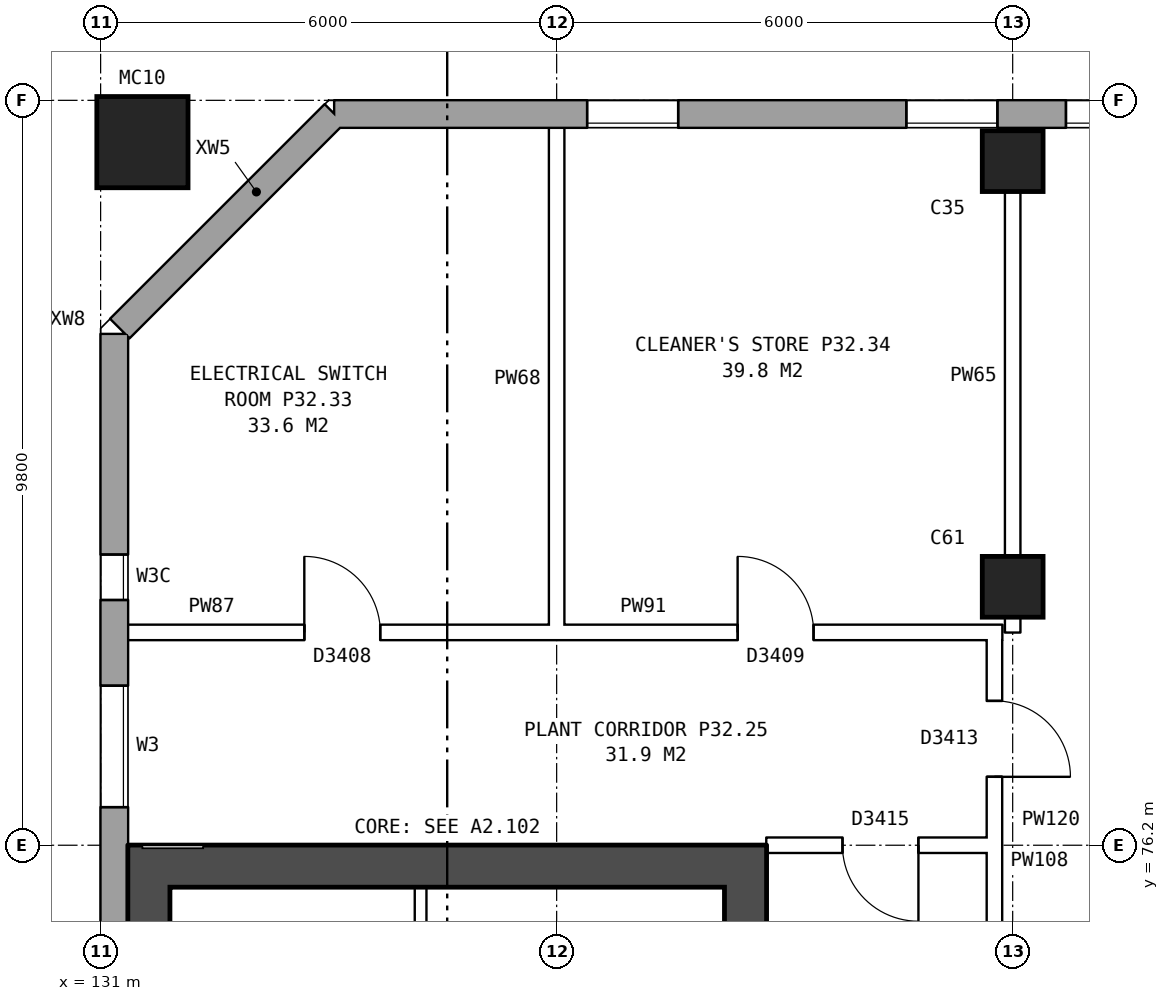
"""IFC4 building model, lengths in metres.
Left out: names, types, materials, properties, quantities, classifications, styles, units other than length and angle.
Written with IfcOpenShell. Run it as: python <this file> out.ifc"""

import sys

from ifc_helpers import new_model, si_unit, direction, frame, frame_2d, origin, origin_2d, place, context, subcontext, project, spatial, rectangle, hollow_rectangle, extrude, element, fill, save


model = new_model("IFC4")
c1 = context("Model", 3, precision=1e-05, world=origin(), true_north=direction((0.0, 1.0)))
c2 = subcontext(c1, "Body", "Model", "MODEL_VIEW")
j1 = project(units=[si_unit("LENGTHUNIT", "METRE"), si_unit("PLANEANGLEUNIT", "RADIAN")], contexts=[c1])
p1 = place(None, origin())
s1 = spatial("IfcSite", under=j1, at=p1, CompositionType="ELEMENT")
p2 = place(p1, origin())
s2 = spatial("IfcBuilding", under=s1, at=p2, CompositionType="ELEMENT")
p3 = place(p2, frame((0.0, 0.0, 115.0)))
s3 = spatial("IfcBuildingStorey", under=s2, at=p3, CompositionType="ELEMENT", Elevation=115.0)
for number, where, z_axis, x_axis in (
    (1, (143.0, 79.6, 0.0), (0.0, 0.0, 1.0), (1.0, 0.0, 0.0)),
    (2, (143.0, 85.2, 0.0), (0.0, 0.0, 1.0), (1.0, 0.0, 0.0)),
):
    element("IfcColumn", number, at=place(p3, frame(where, z_axis=z_axis, x_axis=x_axis)), inside=s3, PredefinedType="COLUMN", context=c2, shape_type="SweptSolid", body=[
        extrude(rectangle(XDim=0.8, YDim=0.8, at=origin_2d()), origin(), (0.0, 0.0, 1.0), 4.2),
    ])
p4 = place(p3, frame((131.55, 85.45, 0.0), z_axis=(0.0, 0.0, 1.0), x_axis=(1.0, 0.0, 0.0)))
e3 = element("IfcColumn", 3, at=p4, inside=s3, PredefinedType="COLUMN", context=c2, shape_type="SweptSolid", body=[
    extrude(hollow_rectangle(XDim=1.2, YDim=1.2, WallThickness=0.065, at=origin_2d()), origin(), (0.0, 0.0, 1.0), 4.5),
])
p5 = place(p3, frame((169.675, 85.82, 0.0), z_axis=(0.0, 0.0, 1.0), x_axis=(-1.0, 0.0, 0.0)))
e4 = element("IfcWall", 4, at=p5, inside=s3, PredefinedType="STANDARD", context=c2, shape_type="SweptSolid", body=[
    extrude(rectangle(XDim=35.601, YDim=0.36, at=frame_2d((17.8, 0.0))), origin(), (0.0, 0.0, 1.0), 4.2),
])
p6 = place(p5, frame((0.375, 0.0, 1.5)))
e5 = element("IfcOpeningElement", 5, at=p6, cuts=e4, PredefinedType="OPENING", context=c2, shape_type="SweptSolid", body=[
    extrude(rectangle(XDim=1.6, YDim=1.2, at=frame_2d((0.8, 0.6))), frame((0.0, 0.19, 0.0), z_axis=(0.0, -1.0, 0.0), x_axis=(1.0, 0.0, 0.0)), (0.0, 0.0, 1.0), 0.38),
])
p7 = place(p5, frame((2.875, 0.0, 1.5)))
e6 = element("IfcOpeningElement", 6, at=p7, cuts=e4, PredefinedType="OPENING", context=c2, shape_type="SweptSolid", body=[
    extrude(rectangle(XDim=1.6, YDim=1.2, at=frame_2d((0.8, 0.6))), frame((0.0, 0.19, 0.0), z_axis=(0.0, -1.0, 0.0), x_axis=(1.0, 0.0, 0.0)), (0.0, 0.0, 1.0), 0.38),
])
p8 = place(p5, frame((7.175, 0.0, 1.5)))
e7 = element("IfcOpeningElement", 7, at=p8, cuts=e4, PredefinedType="OPENING", context=c2, shape_type="SweptSolid", body=[
    extrude(rectangle(XDim=1.2, YDim=1.2, at=frame_2d((0.6, 0.6))), frame((0.0, 0.19, 0.0), z_axis=(0.0, -1.0, 0.0), x_axis=(1.0, 0.0, 0.0)), (0.0, 0.0, 1.0), 0.38),
])
p9 = place(p5, frame((12.375, 0.0, 1.5)))
e8 = element("IfcOpeningElement", 8, at=p9, cuts=e4, PredefinedType="OPENING", context=c2, shape_type="SweptSolid", body=[
    extrude(rectangle(XDim=1.6, YDim=1.2, at=frame_2d((0.8, 0.6))), frame((0.0, 0.19, 0.0), z_axis=(0.0, -1.0, 0.0), x_axis=(1.0, 0.0, 0.0)), (0.0, 0.0, 1.0), 0.38),
])
p10 = place(p5, frame((14.275, 0.0, 1.5)))
e9 = element("IfcOpeningElement", 9, at=p10, cuts=e4, PredefinedType="OPENING", context=c2, shape_type="SweptSolid", body=[
    extrude(rectangle(XDim=0.6, YDim=1.2, at=frame_2d((0.3, 0.6))), frame((0.0, 0.19, 0.0), z_axis=(0.0, -1.0, 0.0), x_axis=(1.0, 0.0, 0.0)), (0.0, 0.0, 1.0), 0.38),
])
p11 = place(p5, frame((15.175, 0.0, 1.5)))
e10 = element("IfcOpeningElement", 10, at=p11, cuts=e4, PredefinedType="OPENING", context=c2, shape_type="SweptSolid", body=[
    extrude(rectangle(XDim=1.2, YDim=1.2, at=frame_2d((0.6, 0.6))), frame((0.0, 0.19, 0.0), z_axis=(0.0, -1.0, 0.0), x_axis=(1.0, 0.0, 0.0)), (0.0, 0.0, 1.0), 0.38),
])
p12 = place(p5, frame((24.375, 0.0, 1.5)))
e11 = element("IfcOpeningElement", 11, at=p12, cuts=e4, PredefinedType="OPENING", context=c2, shape_type="SweptSolid", body=[
    extrude(rectangle(XDim=1.6, YDim=1.2, at=frame_2d((0.8, 0.6))), frame((0.0, 0.19, 0.0), z_axis=(0.0, -1.0, 0.0), x_axis=(1.0, 0.0, 0.0)), (0.0, 0.0, 1.0), 0.38),
])
p13 = place(p5, frame((26.875, 0.0, 1.5)))
e12 = element("IfcOpeningElement", 12, at=p13, cuts=e4, PredefinedType="OPENING", context=c2, shape_type="SweptSolid", body=[
    extrude(rectangle(XDim=1.2, YDim=1.2, at=frame_2d((0.6, 0.6))), frame((0.0, 0.19, 0.0), z_axis=(0.0, -1.0, 0.0), x_axis=(1.0, 0.0, 0.0)), (0.0, 0.0, 1.0), 0.38),
])
p14 = place(p5, frame((31.075, 0.0, 1.5)))
e13 = element("IfcOpeningElement", 13, at=p14, cuts=e4, PredefinedType="OPENING", context=c2, shape_type="SweptSolid", body=[
    extrude(rectangle(XDim=1.2, YDim=1.2, at=frame_2d((0.6, 0.6))), frame((0.0, 0.19, 0.0), z_axis=(0.0, -1.0, 0.0), x_axis=(1.0, 0.0, 0.0)), (0.0, 0.0, 1.0), 0.38),
])
p15 = place(p5, frame((19.125, 0.0, 1.5)))
e14 = element("IfcOpeningElement", 14, at=p15, cuts=e4, PredefinedType="OPENING", context=c2, shape_type="SweptSolid", body=[
    extrude(rectangle(XDim=1.2, YDim=1.2, at=frame_2d((0.6, 0.6))), frame((0.0, 0.19, 0.0), z_axis=(0.0, -1.0, 0.0), x_axis=(1.0, 0.0, 0.0)), (0.0, 0.0, 1.0), 0.38),
])
p16 = place(p3, frame((134.075, 85.82, 0.0), z_axis=(0.0, 0.0, 1.0), x_axis=(-0.707148882153, -0.707064677713, 0.0)))
e15 = element("IfcWall", 15, at=p16, inside=s3, PredefinedType="STANDARD", context=c2, shape_type="SweptSolid", body=[
    extrude(rectangle(XDim=2.899, YDim=0.36, at=frame_2d((1.45, 0.0))), origin(), (0.0, 0.0, 1.0), 4.2),
])
p17 = place(p3, frame((132.024, 83.77, 0.953), z_axis=(0.0, 0.0, 1.0), x_axis=(-0.706994764273, -0.707218780358, 0.0)))
e16 = element("IfcWall", 16, at=p17, inside=s3, PredefinedType="STANDARD", context=c2, shape_type="SweptSolid", body=[
    extrude(rectangle(XDim=1.09, YDim=0.36, at=frame_2d((0.545, 0.0))), origin(), (0.0, 0.0, 1.0), 2.444),
])
p18 = place(p3, frame((131.18, 82.925, 0.0), z_axis=(0.0, 0.0, 1.0), x_axis=(0.0, -1.0, 0.0)))
e17 = element("IfcWall", 17, at=p18, inside=s3, PredefinedType="STANDARD", context=c2, shape_type="SweptSolid", body=[
    extrude(rectangle(XDim=25.851, YDim=0.36, at=frame_2d((12.925, 0.0))), origin(), (0.0, 0.0, 1.0), 4.2),
])
p19 = place(p18, frame((2.9, 0.0, 1.5)))
e18 = element("IfcOpeningElement", 18, at=p19, cuts=e17, PredefinedType="OPENING", context=c2, shape_type="SweptSolid", body=[
    extrude(rectangle(XDim=0.6, YDim=1.2, at=frame_2d((0.3, 0.6))), frame((0.0, 0.19, 0.0), z_axis=(0.0, -1.0, 0.0), x_axis=(1.0, 0.0, 0.0)), (0.0, 0.0, 1.0), 0.38),
])
p20 = place(p18, frame((4.625, 0.0, 1.5)))
e19 = element("IfcOpeningElement", 19, at=p20, cuts=e17, PredefinedType="OPENING", context=c2, shape_type="SweptSolid", body=[
    extrude(rectangle(XDim=1.6, YDim=1.2, at=frame_2d((0.8, 0.6))), frame((0.0, 0.19, 0.0), z_axis=(0.0, -1.0, 0.0), x_axis=(1.0, 0.0, 0.0)), (0.0, 0.0, 1.0), 0.38),
])
p21 = place(p18, frame((21.1, 0.0, 1.5)))
e20 = element("IfcOpeningElement", 20, at=p21, cuts=e17, PredefinedType="OPENING", context=c2, shape_type="SweptSolid", body=[
    extrude(rectangle(XDim=0.6, YDim=1.2, at=frame_2d((0.3, 0.6))), frame((0.0, 0.19, 0.0), z_axis=(0.0, -1.0, 0.0), x_axis=(1.0, 0.0, 0.0)), (0.0, 0.0, 1.0), 0.38),
])
p22 = place(p18, frame((22.325, 0.0, 1.5)))
e21 = element("IfcOpeningElement", 21, at=p22, cuts=e17, PredefinedType="OPENING", context=c2, shape_type="SweptSolid", body=[
    extrude(rectangle(XDim=0.6, YDim=1.2, at=frame_2d((0.3, 0.6))), frame((0.0, 0.19, 0.0), z_axis=(0.0, -1.0, 0.0), x_axis=(1.0, 0.0, 0.0)), (0.0, 0.0, 1.0), 0.38),
])
p23 = place(p3, frame((139.485, 63.8, 0.0), z_axis=(0.0, 0.0, 1.0), x_axis=(0.0, 1.0, 0.0)))
e22 = element("IfcWall", 22, at=p23, inside=s3, PredefinedType="SHEAR", context=c2, shape_type="SweptSolid", body=[
    extrude(rectangle(XDim=12.4, YDim=0.55, at=frame_2d((6.2, 0.0))), origin(), (0.0, 0.0, 1.0), 4.2),
])
p24 = place(p23, frame((1.325, 0.0, 0.0)))
e23 = element("IfcOpeningElement", 23, at=p24, cuts=e22, PredefinedType="OPENING", context=c2, shape_type="SweptSolid", body=[
    extrude(rectangle(XDim=1.1, YDim=2.1, at=frame_2d((0.55, 1.05))), frame((0.0, 0.285, 0.0), z_axis=(0.0, -1.0, 0.0), x_axis=(1.0, 0.0, 0.0)), (0.0, 0.0, 1.0), 0.57),
])
p25 = place(p23, frame((9.9, 0.0, 0.0)))
e24 = element("IfcOpeningElement", 24, at=p25, cuts=e22, PredefinedType="OPENING", context=c2, shape_type="SweptSolid", body=[
    extrude(rectangle(XDim=1.1, YDim=2.1, at=frame_2d((0.55, 1.05))), frame((0.0, 0.285, 0.0), z_axis=(0.0, -1.0, 0.0), x_axis=(1.0, 0.0, 0.0)), (0.0, 0.0, 1.0), 0.57),
])
p26 = place(p23, frame((8.125, 0.0, 0.0)))
e25 = element("IfcOpeningElement", 25, at=p26, cuts=e22, PredefinedType="OPENING", context=c2, shape_type="SweptSolid", body=[
    extrude(rectangle(XDim=0.85, YDim=2.1, at=frame_2d((0.425, 1.05))), frame((0.0, 0.285, 0.0), z_axis=(0.0, -1.0, 0.0), x_axis=(1.0, 0.0, 0.0)), (0.0, 0.0, 1.0), 0.57),
])
p27 = place(p3, frame((131.635, 63.8, 0.0), z_axis=(0.0, 0.0, 1.0), x_axis=(0.0, 1.0, 0.0)))
e26 = element("IfcWall", 26, at=p27, inside=s3, PredefinedType="SHEAR", context=c2, shape_type="SweptSolid", body=[
    extrude(rectangle(XDim=12.4, YDim=0.55, at=frame_2d((6.2, 0.0))), origin(), (0.0, 0.0, 1.0), 4.2),
])
p28 = place(p3, frame((139.21, 75.925, 0.0), z_axis=(0.0, 0.0, 1.0), x_axis=(-1.0, 0.0, 0.0)))
e27 = element("IfcWall", 27, at=p28, inside=s3, PredefinedType="SHEAR", context=c2, shape_type="SweptSolid", body=[
    extrude(rectangle(XDim=7.3, YDim=0.55, at=frame_2d((3.65, 0.0))), origin(), (0.0, 0.0, 1.0), 4.2),
])
p29 = place(p3, frame((135.21, 71.375, 0.0), z_axis=(0.0, 0.0, 1.0), x_axis=(0.0, 1.0, 0.0)))
e28 = element("IfcWall", 28, at=p29, inside=s3, PredefinedType="PARTITIONING", context=c2, shape_type="SweptSolid", body=[
    extrude(rectangle(XDim=4.275, YDim=0.15, at=frame_2d((2.137, 0.0))), origin(), (0.0, 0.0, 1.0), 4.2),
])
p30 = place(p29, frame((2.625, 0.0, 0.0)))
e29 = element("IfcOpeningElement", 29, at=p30, cuts=e28, PredefinedType="OPENING", context=c2, shape_type="SweptSolid", body=[
    extrude(rectangle(XDim=1.1, YDim=2.1, at=frame_2d((0.55, 1.05))), frame((0.0, 0.085, 0.0), z_axis=(0.0, -1.0, 0.0), x_axis=(1.0, 0.0, 0.0)), (0.0, 0.0, 1.0), 0.17),
])
p31 = place(p3, frame((142.76, 63.9, 0.0), z_axis=(0.0, 0.0, 1.0), x_axis=(0.0, 1.0, 0.0)))
e30 = element("IfcWall", 30, at=p31, inside=s3, PredefinedType="PARTITIONING", context=c2, shape_type="SweptSolid", body=[
    extrude(rectangle(XDim=12.2, YDim=0.2, at=frame_2d((6.1, 0.0))), origin(), (0.0, 0.0, 1.0), 4.2),
])
p32 = place(p31, frame((5.1, 0.0, 0.0)))
e31 = element("IfcOpeningElement", 31, at=p32, cuts=e30, PredefinedType="OPENING", context=c2, shape_type="SweptSolid", body=[
    extrude(rectangle(XDim=2.0, YDim=2.1, at=frame_2d((1.0, 1.05))), frame((0.0, 0.11, 0.0), z_axis=(0.0, -1.0, 0.0), x_axis=(1.0, 0.0, 0.0)), (0.0, 0.0, 1.0), 0.22),
])
p33 = place(p3, frame((139.76, 76.2, 0.0), z_axis=(0.0, 0.0, 1.0), x_axis=(1.0, 0.0, 0.0)))
e32 = element("IfcWall", 32, at=p33, inside=s3, PredefinedType="PARTITIONING", context=c2, shape_type="SweptSolid", body=[
    extrude(rectangle(XDim=3.1, YDim=0.2, at=frame_2d((1.55, 0.0))), origin(), (0.0, 0.0, 1.0), 4.2),
])
p34 = place(p33, frame((1.0, 0.0, 0.0)))
e33 = element("IfcOpeningElement", 33, at=p34, cuts=e32, PredefinedType="OPENING", context=c2, shape_type="SweptSolid", body=[
    extrude(rectangle(XDim=1.0, YDim=2.1, at=frame_2d((0.5, 1.05))), frame((0.0, 0.11, 0.0), z_axis=(0.0, -1.0, 0.0), x_axis=(1.0, 0.0, 0.0)), (0.0, 0.0, 1.0), 0.22),
])
p35 = place(p3, frame((131.24, 79.0, 0.0), z_axis=(0.0, 0.0, 1.0), x_axis=(1.0, 0.0, 0.0)))
e34 = element("IfcWall", 34, at=p35, inside=s3, PredefinedType="PARTITIONING", context=c2, shape_type="SweptSolid", body=[
    extrude(rectangle(XDim=5.86, YDim=0.2, at=frame_2d((2.93, 0.0))), origin(), (0.0, 0.0, 1.0), 4.2),
])
p36 = place(p35, frame((2.44, 0.0, 0.0)))
e35 = element("IfcOpeningElement", 35, at=p36, cuts=e34, PredefinedType="OPENING", context=c2, shape_type="SweptSolid", body=[
    extrude(rectangle(XDim=1.0, YDim=2.1, at=frame_2d((0.5, 1.05))), frame((0.0, 0.11, 0.0), z_axis=(0.0, -1.0, 0.0), x_axis=(1.0, 0.0, 0.0)), (0.0, 0.0, 1.0), 0.22),
])
p37 = place(p3, frame((136.9, 79.0, 0.0), z_axis=(0.0, 0.0, 1.0), x_axis=(1.0, 0.0, 0.0)))
e36 = element("IfcWall", 36, at=p37, inside=s3, PredefinedType="PARTITIONING", context=c2, shape_type="SweptSolid", body=[
    extrude(rectangle(XDim=5.962, YDim=0.2, at=frame_2d((2.981, 0.0))), origin(), (0.0, 0.0, 1.0), 4.2),
])
p38 = place(p37, frame((2.481, 0.0, 0.0)))
e37 = element("IfcOpeningElement", 37, at=p38, cuts=e36, PredefinedType="OPENING", context=c2, shape_type="SweptSolid", body=[
    extrude(rectangle(XDim=1.0, YDim=2.1, at=frame_2d((0.5, 1.05))), frame((0.0, 0.11, 0.0), z_axis=(0.0, -1.0, 0.0), x_axis=(1.0, 0.0, 0.0)), (0.0, 0.0, 1.0), 0.22),
])
p39 = place(p3, frame((137.0, 78.9, 0.0), z_axis=(0.0, 0.0, 1.0), x_axis=(0.0, 1.0, 0.0)))
e38 = element("IfcWall", 38, at=p39, inside=s3, PredefinedType="PARTITIONING", context=c2, shape_type="SweptSolid", body=[
    extrude(rectangle(XDim=6.86, YDim=0.2, at=frame_2d((3.43, 0.0))), origin(), (0.0, 0.0, 1.0), 4.2),
])
p40 = place(p3, frame((142.76, 76.1, 0.0), z_axis=(0.0, 0.0, 1.0), x_axis=(0.0, 1.0, 0.0)))
e39 = element("IfcWall", 39, at=p40, inside=s3, PredefinedType="PARTITIONING", context=c2, shape_type="SweptSolid", body=[
    extrude(rectangle(XDim=3.0, YDim=0.2, at=frame_2d((1.5, 0.0))), origin(), (0.0, 0.0, 1.0), 4.2),
])
p41 = place(p40, frame((1.0, 0.0, 0.0)))
e40 = element("IfcOpeningElement", 40, at=p41, cuts=e39, PredefinedType="OPENING", context=c2, shape_type="SweptSolid", body=[
    extrude(rectangle(XDim=1.0, YDim=2.1, at=frame_2d((0.5, 1.05))), frame((0.0, 0.11, 0.0), z_axis=(0.0, -1.0, 0.0), x_axis=(1.0, 0.0, 0.0)), (0.0, 0.0, 1.0), 0.22),
])
p42 = place(p3, frame((143.0, 79.0, 0.0), z_axis=(0.0, 0.0, 1.0), x_axis=(0.0, 1.0, 0.0)))
e41 = element("IfcWall", 41, at=p42, inside=s3, PredefinedType="PARTITIONING", context=c2, shape_type="SweptSolid", body=[
    extrude(rectangle(XDim=6.76, YDim=0.2, at=frame_2d((3.38, 0.0))), origin(), (0.0, 0.0, 1.0), 4.2),
])
p43 = place(p12, origin())
e42 = element("IfcWindow", 42, at=p43, inside=s3, PartitioningType="DOUBLE_PANEL_HORIZONTAL", PredefinedType="WINDOW", context=c2, shape_type="SweptSolid", body=[
    extrude(rectangle(XDim=1.6, YDim=1.2, at=frame_2d((0.8, 0.6))), frame((0.0, 0.15, 0.0), z_axis=(0.0, -1.0, 0.0), x_axis=(1.0, 0.0, 0.0)), (0.0, 0.0, 1.0), 0.06),
])
fill(e11, e42)
p44 = place(p13, origin())
e43 = element("IfcWindow", 43, at=p44, inside=s3, PartitioningType="DOUBLE_PANEL_HORIZONTAL", PredefinedType="WINDOW", context=c2, shape_type="SweptSolid", body=[
    extrude(rectangle(XDim=1.2, YDim=1.2, at=frame_2d((0.6, 0.6))), frame((0.0, 0.15, 0.0), z_axis=(0.0, -1.0, 0.0), x_axis=(1.0, 0.0, 0.0)), (0.0, 0.0, 1.0), 0.06),
])
fill(e12, e43)
p45 = place(p14, origin())
e44 = element("IfcWindow", 44, at=p45, inside=s3, PartitioningType="DOUBLE_PANEL_HORIZONTAL", PredefinedType="WINDOW", context=c2, shape_type="SweptSolid", body=[
    extrude(rectangle(XDim=1.2, YDim=1.2, at=frame_2d((0.6, 0.6))), frame((0.0, 0.15, 0.0), z_axis=(0.0, -1.0, 0.0), x_axis=(1.0, 0.0, 0.0)), (0.0, 0.0, 1.0), 0.06),
])
fill(e13, e44)
p46 = place(p19, origin())
e45 = element("IfcWindow", 45, at=p46, inside=s3, PartitioningType="DOUBLE_PANEL_HORIZONTAL", PredefinedType="WINDOW", context=c2, shape_type="SweptSolid", body=[
    extrude(rectangle(XDim=0.6, YDim=1.2, at=frame_2d((0.3, 0.6))), frame((0.0, 0.15, 0.0), z_axis=(0.0, -1.0, 0.0), x_axis=(1.0, 0.0, 0.0)), (0.0, 0.0, 1.0), 0.06),
])
fill(e18, e45)
p47 = place(p20, origin())
e46 = element("IfcWindow", 46, at=p47, inside=s3, PartitioningType="DOUBLE_PANEL_HORIZONTAL", PredefinedType="WINDOW", context=c2, shape_type="SweptSolid", body=[
    extrude(rectangle(XDim=1.6, YDim=1.2, at=frame_2d((0.8, 0.6))), frame((0.0, 0.15, 0.0), z_axis=(0.0, -1.0, 0.0), x_axis=(1.0, 0.0, 0.0)), (0.0, 0.0, 1.0), 0.06),
])
fill(e19, e46)
p48 = place(p34, frame((1.0, 0.0, 0.0), z_axis=(0.0, 0.0, 1.0), x_axis=(-1.0, 0.0, 0.0)))
e47 = element("IfcDoor", 47, at=p48, inside=s3, OperationType="SINGLE_SWING_LEFT", PredefinedType="DOOR", context=c2, shape_type="SweptSolid", body=[
    extrude(rectangle(XDim=1.0, YDim=2.1, at=frame_2d((0.5, 1.05))), frame((0.0, 0.025, 0.0), z_axis=(0.0, -1.0, 0.0), x_axis=(1.0, 0.0, 0.0)), (0.0, 0.0, 1.0), 0.05),
])
fill(e33, e47)
p49 = place(p36, origin())
e48 = element("IfcDoor", 48, at=p49, inside=s3, OperationType="SINGLE_SWING_LEFT", PredefinedType="DOOR", context=c2, shape_type="SweptSolid", body=[
    extrude(rectangle(XDim=1.0, YDim=2.1, at=frame_2d((0.5, 1.05))), frame((0.0, 0.025, 0.0), z_axis=(0.0, -1.0, 0.0), x_axis=(1.0, 0.0, 0.0)), (0.0, 0.0, 1.0), 0.05),
])
fill(e35, e48)
p50 = place(p38, origin())
e49 = element("IfcDoor", 49, at=p50, inside=s3, OperationType="SINGLE_SWING_LEFT", PredefinedType="DOOR", context=c2, shape_type="SweptSolid", body=[
    extrude(rectangle(XDim=1.0, YDim=2.1, at=frame_2d((0.5, 1.05))), frame((0.0, 0.025, 0.0), z_axis=(0.0, -1.0, 0.0), x_axis=(1.0, 0.0, 0.0)), (0.0, 0.0, 1.0), 0.05),
])
fill(e37, e49)
p51 = place(p41, frame((1.0, 0.0, 0.0), z_axis=(0.0, 0.0, 1.0), x_axis=(-1.0, 0.0, 0.0)))
e50 = element("IfcDoor", 50, at=p51, inside=s3, OperationType="SINGLE_SWING_RIGHT", PredefinedType="DOOR", context=c2, shape_type="SweptSolid", body=[
    extrude(rectangle(XDim=1.0, YDim=2.1, at=frame_2d((0.5, 1.05))), frame((0.0, 0.025, 0.0), z_axis=(0.0, -1.0, 0.0), x_axis=(1.0, 0.0, 0.0)), (0.0, 0.0, 1.0), 0.05),
])
fill(e40, e50)
save(model, sys.argv[1])
